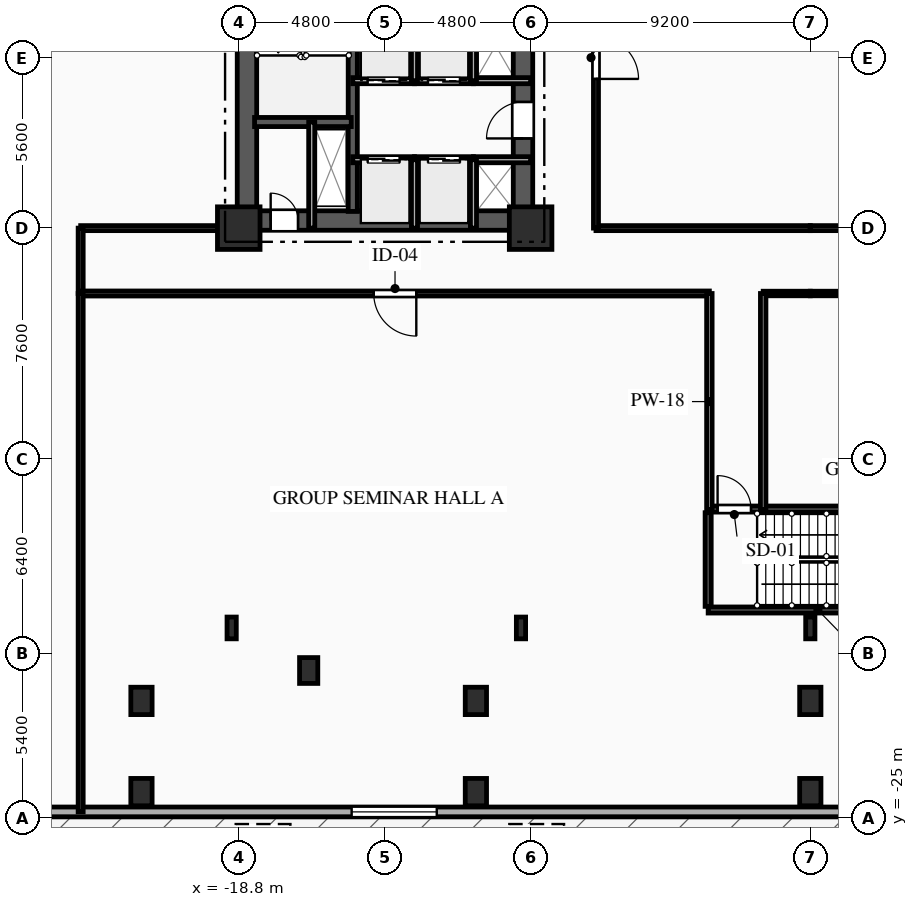
"""IFC4 building model, lengths in metres.
Left out: names, types, materials, properties, quantities, classifications, styles, units other than length and angle.
Written with IfcOpenShell. Run it as: python <this file> out.ifc"""

import sys

from ifc_helpers import new_model, si_unit, direction, frame, frame_2d, origin, origin_2d, place, context, subcontext, project, spatial, rectangle, i_section, extrude, element, fill, save


model = new_model("IFC4")
c1 = context("Model", 3, precision=1e-05, world=origin(), true_north=direction((0.0, 1.0)))
c2 = subcontext(c1, "Body", "Model", "MODEL_VIEW")
j1 = project(units=[si_unit("LENGTHUNIT", "METRE"), si_unit("PLANEANGLEUNIT", "RADIAN")], contexts=[c1])
p1 = place(None, origin())
s1 = spatial("IfcSite", under=j1, at=p1, CompositionType="ELEMENT")
p2 = place(p1, origin())
s2 = spatial("IfcBuilding", under=s1, at=p2, CompositionType="ELEMENT")
p3 = place(p2, frame((0.0, 0.0, 4.5)))
s3 = spatial("IfcBuildingStorey", under=s2, at=p3, CompositionType="ELEMENT", Elevation=4.5)
for number, where, z_axis, x_axis in (
    (1, (-18.8, -5.6, 0.0), (0.0, 0.0, 1.0), (1.0, 0.0, 0.0)),
    (2, (-9.2, -5.6, 0.0), (0.0, 0.0, 1.0), (1.0, 0.0, 0.0)),
):
    element("IfcColumn", number, at=place(p3, frame(where, z_axis=z_axis, x_axis=x_axis)), inside=s3, PredefinedType="COLUMN", context=c2, shape_type="SweptSolid", body=[
        extrude(rectangle(XDim=1.4, YDim=1.4, at=origin_2d()), origin(), (0.0, 0.0, 1.0), 4.5),
    ])
for number, where, z_axis, x_axis in (
    (3, (-22.0, -21.15, 0.0), (0.0, 0.0, 1.0), (1.0, 0.0, 0.0)),
    (4, (-11.0, -21.15, 0.0), (0.0, 0.0, 1.0), (1.0, 0.0, 0.0)),
    (5, (0.0, -21.15, 0.0), (0.0, 0.0, 1.0), (1.0, 0.0, 0.0)),
    (6, (-22.0, -24.15, 0.0), (0.0, 0.0, 1.0), (1.0, 0.0, 0.0)),
    (7, (-11.0, -24.15, 0.0), (0.0, 0.0, 1.0), (1.0, 0.0, 0.0)),
    (8, (0.0, -24.15, 0.0), (0.0, 0.0, 1.0), (1.0, 0.0, 0.0)),
):
    element("IfcColumn", number, at=place(p3, frame(where, z_axis=z_axis, x_axis=x_axis)), inside=s3, PredefinedType="COLUMN", context=c2, shape_type="SweptSolid", body=[
        extrude(rectangle(XDim=0.7, YDim=0.9, at=origin_2d()), origin(), (0.0, 0.0, 1.0), 4.5),
    ])
p4 = place(p3, frame((-16.5, -20.15, 0.0), z_axis=(0.0, 0.0, 1.0), x_axis=(1.0, 0.0, 0.0)))
e9 = element("IfcColumn", 9, at=p4, inside=s3, PredefinedType="PILASTER", context=c2, shape_type="SweptSolid", body=[
    extrude(rectangle(XDim=0.6, YDim=0.85, at=origin_2d()), origin(), (0.0, 0.0, 1.0), 4.5),
])
for number, where, z_axis, x_axis in (
    (10, (-19.033, -18.75, 0.0), (0.0, 0.0, 1.0), (1.0, 0.0, 0.0)),
    (11, (-9.517, -18.75, 0.0), (0.0, 0.0, 1.0), (1.0, 0.0, 0.0)),
    (12, (0.0, -18.75, 0.0), (0.0, 0.0, 1.0), (1.0, 0.0, 0.0)),
):
    element("IfcColumn", number, at=place(p3, frame(where, z_axis=z_axis, x_axis=x_axis)), inside=s3, PredefinedType="COLUMN", context=c2, shape_type="SweptSolid", body=[
        extrude(i_section(OverallWidth=0.304, OverallDepth=0.716, WebThickness=0.021, FlangeThickness=0.04, FilletRadius=0.027, at=origin_2d()), origin(), (0.0, 0.0, 1.0), 4.5),
    ])
p5 = place(p3, frame((38.3, -24.8, 0.0), z_axis=(0.0, 0.0, 1.0), x_axis=(-1.0, 0.0, 0.0)))
e13 = element("IfcWall", 13, at=p5, inside=s3, PredefinedType="SOLIDWALL", context=c2, shape_type="SweptSolid", body=[
    extrude(rectangle(XDim=76.6, YDim=0.32, at=frame_2d((38.3, 0.0))), origin(), (0.0, 0.0, 1.0), 4.17),
])
p6 = place(p5, frame((6.004, 0.0, 0.85)))
e14 = element("IfcOpeningElement", 14, at=p6, cuts=e13, PredefinedType="OPENING", context=c2, shape_type="SweptSolid", body=[
    extrude(rectangle(XDim=2.8, YDim=2.4, at=frame_2d((1.4, 1.2))), frame((0.0, 0.17, 0.0), z_axis=(0.0, -1.0, 0.0), x_axis=(1.0, 0.0, 0.0)), (0.0, 0.0, 1.0), 0.34),
])
p7 = place(p5, frame((30.697, 0.0, 0.85)))
e15 = element("IfcOpeningElement", 15, at=p7, cuts=e13, PredefinedType="OPENING", context=c2, shape_type="SweptSolid", body=[
    extrude(rectangle(XDim=2.8, YDim=2.4, at=frame_2d((1.4, 1.2))), frame((0.0, 0.17, 0.0), z_axis=(0.0, -1.0, 0.0), x_axis=(1.0, 0.0, 0.0)), (0.0, 0.0, 1.0), 0.34),
])
p8 = place(p5, frame((50.587, 0.0, 0.85)))
e16 = element("IfcOpeningElement", 16, at=p8, cuts=e13, PredefinedType="OPENING", context=c2, shape_type="SweptSolid", body=[
    extrude(rectangle(XDim=2.8, YDim=2.4, at=frame_2d((1.4, 1.2))), frame((0.0, 0.17, 0.0), z_axis=(0.0, -1.0, 0.0), x_axis=(1.0, 0.0, 0.0)), (0.0, 0.0, 1.0), 0.34),
])
p9 = place(p5, frame((67.876, 0.0, 0.85)))
e17 = element("IfcOpeningElement", 17, at=p9, cuts=e13, PredefinedType="OPENING", context=c2, shape_type="SweptSolid", body=[
    extrude(rectangle(XDim=2.8, YDim=2.4, at=frame_2d((1.4, 1.2))), frame((0.0, 0.17, 0.0), z_axis=(0.0, -1.0, 0.0), x_axis=(1.0, 0.0, 0.0)), (0.0, 0.0, 1.0), 0.34),
])
p10 = place(p3, frame((-18.8, -5.35, 0.0), z_axis=(0.0, 0.0, 1.0), x_axis=(1.0, 0.0, 0.0)))
e18 = element("IfcWall", 18, at=p10, inside=s3, PredefinedType="SHEAR", context=c2, shape_type="SweptSolid", body=[
    extrude(rectangle(XDim=9.6, YDim=0.64, at=frame_2d((4.8, 0.0))), origin(), (0.0, 0.0, 1.0), 4.17),
])
p11 = place(p10, frame((1.05, 0.0, 0.0)))
e19 = element("IfcOpeningElement", 19, at=p11, cuts=e18, PredefinedType="OPENING", context=c2, shape_type="SweptSolid", body=[
    extrude(rectangle(XDim=0.9, YDim=2.1, at=frame_2d((0.45, 1.05))), frame((0.0, 0.33, 0.0), z_axis=(0.0, -1.0, 0.0), x_axis=(1.0, 0.0, 0.0)), (0.0, 0.0, 1.0), 0.66),
])
p12 = place(p3, frame((-18.53, -5.05, 0.0), z_axis=(0.0, 0.0, 1.0), x_axis=(0.0, 1.0, 0.0)))
e20 = element("IfcWall", 20, at=p12, inside=s3, PredefinedType="SHEAR", context=c2, shape_type="SweptSolid", body=[
    extrude(rectangle(XDim=10.1, YDim=0.64, at=frame_2d((5.05, 0.0))), origin(), (0.0, 0.0, 1.0), 4.17),
])
p13 = place(p3, frame((-9.45, -5.05, 0.0), z_axis=(0.0, 0.0, 1.0), x_axis=(0.0, 1.0, 0.0)))
e21 = element("IfcWall", 21, at=p13, inside=s3, PredefinedType="SHEAR", context=c2, shape_type="SweptSolid", body=[
    extrude(rectangle(XDim=10.1, YDim=0.64, at=frame_2d((5.05, 0.0))), origin(), (0.0, 0.0, 1.0), 4.17),
])
p14 = place(p13, frame((7.15, 0.0, 0.0)))
e22 = element("IfcOpeningElement", 22, at=p14, cuts=e21, PredefinedType="OPENING", context=c2, shape_type="SweptSolid", body=[
    extrude(rectangle(XDim=0.9, YDim=2.1, at=frame_2d((0.45, 1.05))), frame((0.0, 0.33, 0.0), z_axis=(0.0, -1.0, 0.0), x_axis=(1.0, 0.0, 0.0)), (0.0, 0.0, 1.0), 0.66),
])
p15 = place(p13, frame((2.4, 0.0, 0.0)))
e23 = element("IfcOpeningElement", 23, at=p15, cuts=e21, PredefinedType="OPENING", context=c2, shape_type="SweptSolid", body=[
    extrude(rectangle(XDim=1.2, YDim=2.15, at=frame_2d((0.6, 1.075))), frame((0.0, 0.33, 0.0), z_axis=(0.0, -1.0, 0.0), x_axis=(1.0, 0.0, 0.0)), (0.0, 0.0, 1.0), 0.66),
])
p16 = place(p3, frame((-15.05, -5.05, 0.0), z_axis=(0.0, 0.0, 1.0), x_axis=(0.0, 1.0, 0.0)))
e24 = element("IfcWall", 24, at=p16, inside=s3, PredefinedType="SHEAR", context=c2, shape_type="SweptSolid", body=[
    extrude(rectangle(XDim=10.1, YDim=0.3, at=frame_2d((5.05, 0.0))), origin(), (0.0, 0.0, 1.0), 4.17),
])
p17 = place(p3, frame((-18.28, -2.11, 0.0), z_axis=(0.0, 0.0, 1.0), x_axis=(1.0, 0.0, 0.0)))
e25 = element("IfcWall", 25, at=p17, inside=s3, PredefinedType="SHEAR", context=c2, shape_type="SweptSolid", body=[
    extrude(rectangle(XDim=3.18, YDim=0.3, at=frame_2d((1.59, 0.0))), origin(), (0.0, 0.0, 1.0), 4.17),
])
p18 = place(p3, frame((-3.36, -14.84, 0.0), z_axis=(0.0, 0.0, 1.0), x_axis=(1.0, 0.0, 0.0)))
e26 = element("IfcWall", 26, at=p18, inside=s3, PredefinedType="SHEAR", context=c2, shape_type="SweptSolid", body=[
    extrude(rectangle(XDim=7.22, YDim=0.2, at=frame_2d((3.61, 0.0))), origin(), (0.0, 0.0, 1.0), 4.17),
])
p19 = place(p18, frame((0.31, 0.0, 0.0)))
e27 = element("IfcOpeningElement", 27, at=p19, cuts=e26, PredefinedType="OPENING", context=c2, shape_type="SweptSolid", body=[
    extrude(rectangle(XDim=1.1, YDim=2.15, at=frame_2d((0.55, 1.075))), frame((0.0, 0.11, 0.0), z_axis=(0.0, -1.0, 0.0), x_axis=(1.0, 0.0, 0.0)), (0.0, 0.0, 1.0), 0.22),
])
p20 = place(p3, frame((-3.36, -18.16, 0.0), z_axis=(0.0, 0.0, 1.0), x_axis=(1.0, 0.0, 0.0)))
e28 = element("IfcWall", 28, at=p20, inside=s3, PredefinedType="SHEAR", context=c2, shape_type="SweptSolid", body=[
    extrude(rectangle(XDim=7.22, YDim=0.2, at=frame_2d((3.61, 0.0))), origin(), (0.0, 0.0, 1.0), 4.17),
])
p21 = place(p3, frame((-3.36, -18.04, 0.0), z_axis=(0.0, 0.0, 1.0), x_axis=(0.0, 1.0, 0.0)))
e29 = element("IfcWall", 29, at=p21, inside=s3, PredefinedType="SHEAR", context=c2, shape_type="SweptSolid", body=[
    extrude(rectangle(XDim=3.08, YDim=0.2, at=frame_2d((1.54, 0.0))), origin(), (0.0, 0.0, 1.0), 4.17),
])
p22 = place(p3, frame((-16.4, -5.6, 0.0), z_axis=(0.0, 0.0, 1.0), x_axis=(0.0, 1.0, 0.0)))
e30 = element("IfcWall", 30, at=p22, inside=s3, PredefinedType="PARTITIONING", context=c2, shape_type="SweptSolid", body=[
    extrude(rectangle(XDim=3.49, YDim=0.2, at=frame_2d((1.745, 0.0))), origin(), (0.0, 0.0, 1.0), 4.17),
])
p23 = place(p3, frame((-15.05, -3.35, 0.0), z_axis=(0.0, 0.0, 1.0), x_axis=(1.0, 0.0, 0.0)))
e31 = element("IfcWall", 31, at=p23, inside=s3, PredefinedType="PARTITIONING", context=c2, shape_type="SweptSolid", body=[
    extrude(rectangle(XDim=2.03, YDim=0.2, at=frame_2d((1.015, 0.0))), origin(), (0.0, 0.0, 1.0), 4.17),
])
p24 = place(p23, frame((0.49, 0.0, 0.0)))
e32 = element("IfcOpeningElement", 32, at=p24, cuts=e31, PredefinedType="OPENING", context=c2, shape_type="SweptSolid", body=[
    extrude(rectangle(XDim=1.05, YDim=2.1, at=frame_2d((0.525, 1.05))), frame((0.0, 0.11, 0.0), z_axis=(0.0, -1.0, 0.0), x_axis=(1.0, 0.0, 0.0)), (0.0, 0.0, 1.0), 0.22),
])
p25 = place(p3, frame((-13.02, -3.35, 0.0), z_axis=(0.0, 0.0, 1.0), x_axis=(1.0, 0.0, 0.0)))
e33 = element("IfcWall", 33, at=p25, inside=s3, PredefinedType="PARTITIONING", context=c2, shape_type="SweptSolid", body=[
    extrude(rectangle(XDim=1.94, YDim=0.2, at=frame_2d((0.97, 0.0))), origin(), (0.0, 0.0, 1.0), 4.17),
])
p26 = place(p25, frame((0.445, 0.0, 0.0)))
e34 = element("IfcOpeningElement", 34, at=p26, cuts=e33, PredefinedType="OPENING", context=c2, shape_type="SweptSolid", body=[
    extrude(rectangle(XDim=1.05, YDim=2.1, at=frame_2d((0.525, 1.05))), frame((0.0, 0.11, 0.0), z_axis=(0.0, -1.0, 0.0), x_axis=(1.0, 0.0, 0.0)), (0.0, 0.0, 1.0), 0.22),
])
p27 = place(p3, frame((-11.08, -3.35, 0.0), z_axis=(0.0, 0.0, 1.0), x_axis=(1.0, 0.0, 0.0)))
e35 = element("IfcWall", 35, at=p27, inside=s3, PredefinedType="PARTITIONING", context=c2, shape_type="SweptSolid", body=[
    extrude(rectangle(XDim=1.88, YDim=0.2, at=frame_2d((0.94, 0.0))), origin(), (0.0, 0.0, 1.0), 3.885),
])
p28 = place(p3, frame((-13.02, -0.75, 0.0), z_axis=(0.0, 0.0, 1.0), x_axis=(-1.0, 0.0, 0.0)))
e36 = element("IfcWall", 36, at=p28, inside=s3, PredefinedType="PARTITIONING", context=c2, shape_type="SweptSolid", body=[
    extrude(rectangle(XDim=2.03, YDim=0.2, at=frame_2d((1.015, 0.0))), origin(), (0.0, 0.0, 1.0), 4.17),
])
p29 = place(p28, frame((0.49, 0.0, 0.0)))
e37 = element("IfcOpeningElement", 37, at=p29, cuts=e36, PredefinedType="OPENING", context=c2, shape_type="SweptSolid", body=[
    extrude(rectangle(XDim=1.05, YDim=2.1, at=frame_2d((0.525, 1.05))), frame((0.0, 0.11, 0.0), z_axis=(0.0, -1.0, 0.0), x_axis=(1.0, 0.0, 0.0)), (0.0, 0.0, 1.0), 0.22),
])
p30 = place(p3, frame((-11.08, -0.75, 0.0), z_axis=(0.0, 0.0, 1.0), x_axis=(-1.0, 0.0, 0.0)))
e38 = element("IfcWall", 38, at=p30, inside=s3, PredefinedType="PARTITIONING", context=c2, shape_type="SweptSolid", body=[
    extrude(rectangle(XDim=1.94, YDim=0.2, at=frame_2d((0.97, 0.0))), origin(), (0.0, 0.0, 1.0), 4.17),
])
p31 = place(p30, frame((0.445, 0.0, 0.0)))
e39 = element("IfcOpeningElement", 39, at=p31, cuts=e38, PredefinedType="OPENING", context=c2, shape_type="SweptSolid", body=[
    extrude(rectangle(XDim=1.05, YDim=2.1, at=frame_2d((0.525, 1.05))), frame((0.0, 0.11, 0.0), z_axis=(0.0, -1.0, 0.0), x_axis=(1.0, 0.0, 0.0)), (0.0, 0.0, 1.0), 0.22),
])
p32 = place(p3, frame((-9.2, -0.75, 0.0), z_axis=(0.0, 0.0, 1.0), x_axis=(-1.0, 0.0, 0.0)))
e40 = element("IfcWall", 40, at=p32, inside=s3, PredefinedType="PARTITIONING", context=c2, shape_type="SweptSolid", body=[
    extrude(rectangle(XDim=1.88, YDim=0.2, at=frame_2d((0.94, 0.0))), origin(), (0.0, 0.0, 1.0), 4.17),
])
for number, where, z_axis, x_axis in (
    (41, (-13.02, -5.6, 0.0), (0.0, 0.0, 1.0), (0.0, 1.0, 0.0)),
    (42, (-11.08, -5.6, 0.0), (0.0, 0.0, 1.0), (0.0, 1.0, 0.0)),
):
    element("IfcWall", number, at=place(p3, frame(where, z_axis=z_axis, x_axis=x_axis)), inside=s3, PredefinedType="PARTITIONING", context=c2, shape_type="SweptSolid", body=[
        extrude(rectangle(XDim=2.25, YDim=0.2, at=frame_2d((1.125, 0.0))), origin(), (0.0, 0.0, 1.0), 4.17),
    ])
for number, where, z_axis, x_axis in (
    (43, (-13.02, -0.75, 0.0), (0.0, 0.0, 1.0), (0.0, 1.0, 0.0)),
    (44, (-11.08, -0.75, 0.0), (0.0, 0.0, 1.0), (0.0, 1.0, 0.0)),
):
    element("IfcWall", number, at=place(p3, frame(where, z_axis=z_axis, x_axis=x_axis)), inside=s3, PredefinedType="PARTITIONING", context=c2, shape_type="SweptSolid", body=[
        extrude(rectangle(XDim=2.3, YDim=0.2, at=frame_2d((1.15, 0.0))), origin(), (0.0, 0.0, 1.0), 4.17),
    ])
p33 = place(p3, frame((-24.0, -5.6, 0.0), z_axis=(0.0, 0.0, 1.0), x_axis=(1.0, 0.0, 0.0)))
e45 = element("IfcWall", 45, at=p33, inside=s3, PredefinedType="PARTITIONING", context=c2, shape_type="SweptSolid", body=[
    extrude(rectangle(XDim=5.2, YDim=0.165, at=frame_2d((2.6, 0.0))), origin(), (0.0, 0.0, 1.0), 4.17),
])
p34 = place(p3, frame((-24.0, -7.75, 0.0), z_axis=(0.0, 0.0, 1.0), x_axis=(0.0, 1.0, 0.0)))
e46 = element("IfcWall", 46, at=p34, inside=s3, PredefinedType="PARTITIONING", context=c2, shape_type="SweptSolid", body=[
    extrude(rectangle(XDim=2.15, YDim=0.165, at=frame_2d((1.075, 0.0))), origin(), (0.0, 0.0, 1.0), 4.17),
])
p35 = place(p3, frame((-3.32, -7.75, 0.0), z_axis=(0.0, 0.0, 1.0), x_axis=(-1.0, 0.0, 0.0)))
e47 = element("IfcWall", 47, at=p35, inside=s3, PredefinedType="PARTITIONING", context=c2, shape_type="SweptSolid", body=[
    extrude(rectangle(XDim=20.68, YDim=0.165, at=frame_2d((10.34, 0.0))), origin(), (0.0, 0.0, 1.0), 4.17),
])
p36 = place(p35, frame((9.64, 0.0, 0.0)))
e48 = element("IfcOpeningElement", 48, at=p36, cuts=e47, PredefinedType="OPENING", context=c2, shape_type="SweptSolid", body=[
    extrude(rectangle(XDim=1.4, YDim=2.3, at=frame_2d((0.7, 1.15))), frame((0.0, 0.093, 0.0), z_axis=(0.0, -1.0, 0.0), x_axis=(1.0, 0.0, 0.0)), (0.0, 0.0, 1.0), 0.185),
])
p37 = place(p3, frame((0.0, -7.75, 0.0), z_axis=(0.0, 0.0, 1.0), x_axis=(-1.0, 0.0, 0.0)))
e49 = element("IfcWall", 49, at=p37, inside=s3, PredefinedType="PARTITIONING", context=c2, shape_type="SweptSolid", body=[
    extrude(rectangle(XDim=1.55, YDim=0.15, at=frame_2d((0.775, 0.0))), origin(), (0.0, 0.0, 1.0), 4.17),
])
p38 = place(p3, frame((-7.05, -5.6, 0.0), z_axis=(0.0, 0.0, 1.0), x_axis=(1.0, 0.0, 0.0)))
e50 = element("IfcWall", 50, at=p38, inside=s3, PredefinedType="PARTITIONING", context=c2, shape_type="SweptSolid", body=[
    extrude(rectangle(XDim=7.05, YDim=0.165, at=frame_2d((3.525, 0.0))), origin(), (0.0, 0.0, 1.0), 3.655),
])
p39 = place(p3, frame((14.0, -7.75, 0.0), z_axis=(0.0, 0.0, 1.0), x_axis=(-1.0, 0.0, 0.0)))
e51 = element("IfcWall", 51, at=p39, inside=s3, PredefinedType="PARTITIONING", context=c2, shape_type="SweptSolid", body=[
    extrude(rectangle(XDim=14.0, YDim=0.15, at=frame_2d((7.0, 0.0))), origin(), (0.0, 0.0, 1.0), 4.17),
])
p40 = place(p39, frame((10.896, 0.0, 0.0)))
e52 = element("IfcOpeningElement", 52, at=p40, cuts=e51, PredefinedType="OPENING", context=c2, shape_type="SweptSolid", body=[
    extrude(rectangle(XDim=1.05, YDim=2.15, at=frame_2d((0.525, 1.075))), frame((0.0, 0.085, 0.0), z_axis=(0.0, -1.0, 0.0), x_axis=(1.0, 0.0, 0.0)), (0.0, 0.0, 1.0), 0.17),
])
p41 = place(p3, frame((0.0, -5.6, 0.0), z_axis=(0.0, 0.0, 1.0), x_axis=(1.0, 0.0, 0.0)))
e53 = element("IfcWall", 53, at=p41, inside=s3, PredefinedType="PARTITIONING", context=c2, shape_type="SweptSolid", body=[
    extrude(rectangle(XDim=7.05, YDim=0.165, at=frame_2d((3.525, 0.0))), origin(), (0.0, 0.0, 1.0), 3.655),
])
p42 = place(p3, frame((-7.05, 8.5, 0.0), z_axis=(0.0, 0.0, 1.0), x_axis=(0.0, -1.0, 0.0)))
e54 = element("IfcWall", 54, at=p42, inside=s3, PredefinedType="PARTITIONING", context=c2, shape_type="SweptSolid", body=[
    extrude(rectangle(XDim=14.1, YDim=0.165, at=frame_2d((7.05, 0.0))), origin(), (0.0, 0.0, 1.0), 4.17),
])
p43 = place(p42, frame((7.792, 0.0, 0.0)))
e55 = element("IfcOpeningElement", 55, at=p43, cuts=e54, PredefinedType="OPENING", context=c2, shape_type="SweptSolid", body=[
    extrude(rectangle(XDim=1.4, YDim=2.3, at=frame_2d((0.7, 1.15))), frame((0.0, 0.093, 0.0), z_axis=(0.0, -1.0, 0.0), x_axis=(1.0, 0.0, 0.0)), (0.0, 0.0, 1.0), 0.185),
])
for number, where, z_axis, x_axis in (
    (56, (-3.32, -14.86, 0.0), (0.0, 0.0, 1.0), (0.0, 1.0, 0.0)),
    (57, (-1.55, -7.75, 0.0), (0.0, 0.0, 1.0), (0.0, -1.0, 0.0)),
):
    element("IfcWall", number, at=place(p3, frame(where, z_axis=z_axis, x_axis=x_axis)), inside=s3, PredefinedType="PARTITIONING", context=c2, shape_type="SweptSolid", body=[
        extrude(rectangle(XDim=7.11, YDim=0.18, at=frame_2d((3.555, 0.0))), origin(), (0.0, 0.0, 1.0), 4.17),
    ])
p44 = place(p3, frame((-24.0, -7.75, 0.0), z_axis=(0.0, 0.0, 1.0), x_axis=(0.0, -1.0, 0.0)))
e58 = element("IfcWall", 58, at=p44, inside=s3, PredefinedType="PARTITIONING", context=c2, shape_type="SweptSolid", body=[
    extrude(rectangle(XDim=17.05, YDim=0.165, at=frame_2d((8.525, 0.0))), origin(), (0.0, 0.0, 1.0), 4.17),
])
p45 = place(p8, origin())
e59 = element("IfcWindow", 59, at=p45, inside=s3, PartitioningType="SINGLE_PANEL", PredefinedType="WINDOW", context=c2, shape_type="SweptSolid", body=[
    extrude(rectangle(XDim=2.8, YDim=2.4, at=frame_2d((1.4, 1.2))), frame((0.0, 0.03, 0.0), z_axis=(0.0, -1.0, 0.0), x_axis=(1.0, 0.0, 0.0)), (0.0, 0.0, 1.0), 0.06),
])
fill(e16, e59)
p46 = place(p3, frame((0.0, 0.0, -0.24)))
p47 = place(p46, frame((-18.0, -26.1, 0.0)))
p48 = place(p47, frame((0.0, 0.0, 0.19)))
e60 = element("IfcWindow", 60, at=p48, inside=s3, PartitioningType="SINGLE_PANEL", PredefinedType="SKYLIGHT", context=c2, shape_type="SweptSolid", body=[
    extrude(rectangle(XDim=1.8, YDim=1.8, at=origin_2d()), origin(), (0.0, 0.0, 1.0), 0.05),
])
p49 = place(p46, frame((-9.0, -26.1, 0.0)))
p50 = place(p49, frame((0.0, 0.0, 0.19)))
e61 = element("IfcWindow", 61, at=p50, inside=s3, PartitioningType="SINGLE_PANEL", PredefinedType="SKYLIGHT", context=c2, shape_type="SweptSolid", body=[
    extrude(rectangle(XDim=1.8, YDim=1.8, at=origin_2d()), origin(), (0.0, 0.0, 1.0), 0.05),
])
p51 = place(p11, origin())
e62 = element("IfcDoor", 62, at=p51, inside=s3, OperationType="SINGLE_SWING_LEFT", PredefinedType="DOOR", context=c2, shape_type="SweptSolid", body=[
    extrude(rectangle(XDim=0.9, YDim=2.1, at=frame_2d((0.45, 1.05))), frame((0.0, 0.025, 0.0), z_axis=(0.0, -1.0, 0.0), x_axis=(1.0, 0.0, 0.0)), (0.0, 0.0, 1.0), 0.05),
])
fill(e19, e62)
p52 = place(p19, origin())
e63 = element("IfcDoor", 63, at=p52, inside=s3, OperationType="SINGLE_SWING_LEFT", PredefinedType="DOOR", context=c2, shape_type="SweptSolid", body=[
    extrude(rectangle(XDim=1.1, YDim=2.15, at=frame_2d((0.55, 1.075))), frame((0.0, 0.025, 0.0), z_axis=(0.0, -1.0, 0.0), x_axis=(1.0, 0.0, 0.0)), (0.0, 0.0, 1.0), 0.05),
])
fill(e27, e63)
p53 = place(p24, origin())
e64 = element("IfcDoor", 64, at=p53, inside=s3, OperationType="DOUBLE_DOOR_SLIDING", PredefinedType="DOOR", context=c2, shape_type="SweptSolid", body=[
    extrude(rectangle(XDim=1.05, YDim=2.1, at=frame_2d((0.525, 1.05))), frame((0.0, 0.025, 0.0), z_axis=(0.0, -1.0, 0.0), x_axis=(1.0, 0.0, 0.0)), (0.0, 0.0, 1.0), 0.05),
])
fill(e32, e64)
p54 = place(p26, origin())
e65 = element("IfcDoor", 65, at=p54, inside=s3, OperationType="DOUBLE_DOOR_SLIDING", PredefinedType="DOOR", context=c2, shape_type="SweptSolid", body=[
    extrude(rectangle(XDim=1.05, YDim=2.1, at=frame_2d((0.525, 1.05))), frame((0.0, 0.025, 0.0), z_axis=(0.0, -1.0, 0.0), x_axis=(1.0, 0.0, 0.0)), (0.0, 0.0, 1.0), 0.05),
])
fill(e34, e65)
p55 = place(p29, origin())
e66 = element("IfcDoor", 66, at=p55, inside=s3, OperationType="DOUBLE_DOOR_SLIDING", PredefinedType="DOOR", context=c2, shape_type="SweptSolid", body=[
    extrude(rectangle(XDim=1.05, YDim=2.1, at=frame_2d((0.525, 1.05))), frame((0.0, 0.025, 0.0), z_axis=(0.0, -1.0, 0.0), x_axis=(1.0, 0.0, 0.0)), (0.0, 0.0, 1.0), 0.05),
])
fill(e37, e66)
p56 = place(p31, origin())
e67 = element("IfcDoor", 67, at=p56, inside=s3, OperationType="DOUBLE_DOOR_SLIDING", PredefinedType="DOOR", context=c2, shape_type="SweptSolid", body=[
    extrude(rectangle(XDim=1.05, YDim=2.1, at=frame_2d((0.525, 1.05))), frame((0.0, 0.025, 0.0), z_axis=(0.0, -1.0, 0.0), x_axis=(1.0, 0.0, 0.0)), (0.0, 0.0, 1.0), 0.05),
])
fill(e39, e67)
p57 = place(p15, origin())
e68 = element("IfcDoor", 68, at=p57, inside=s3, OperationType="SINGLE_SWING_LEFT", PredefinedType="DOOR", context=c2, shape_type="SweptSolid", body=[
    extrude(rectangle(XDim=1.2, YDim=2.15, at=frame_2d((0.6, 1.075))), frame((0.0, 0.025, 0.0), z_axis=(0.0, -1.0, 0.0), x_axis=(1.0, 0.0, 0.0)), (0.0, 0.0, 1.0), 0.05),
])
fill(e23, e68)
p58 = place(p36, origin())
e69 = element("IfcDoor", 69, at=p58, inside=s3, OperationType="SINGLE_SWING_LEFT", PredefinedType="DOOR", context=c2, shape_type="SweptSolid", body=[
    extrude(rectangle(XDim=1.4, YDim=2.3, at=frame_2d((0.7, 1.15))), frame((0.0, 0.025, 0.0), z_axis=(0.0, -1.0, 0.0), x_axis=(1.0, 0.0, 0.0)), (0.0, 0.0, 1.0), 0.05),
])
fill(e48, e69)
p59 = place(p43, origin())
e70 = element("IfcDoor", 70, at=p59, inside=s3, OperationType="SINGLE_SWING_RIGHT", PredefinedType="DOOR", context=c2, shape_type="SweptSolid", body=[
    extrude(rectangle(XDim=1.4, YDim=2.3, at=frame_2d((0.7, 1.15))), frame((0.0, 0.025, 0.0), z_axis=(0.0, -1.0, 0.0), x_axis=(1.0, 0.0, 0.0)), (0.0, 0.0, 1.0), 0.05),
])
fill(e55, e70)
save(model, sys.argv[1])
